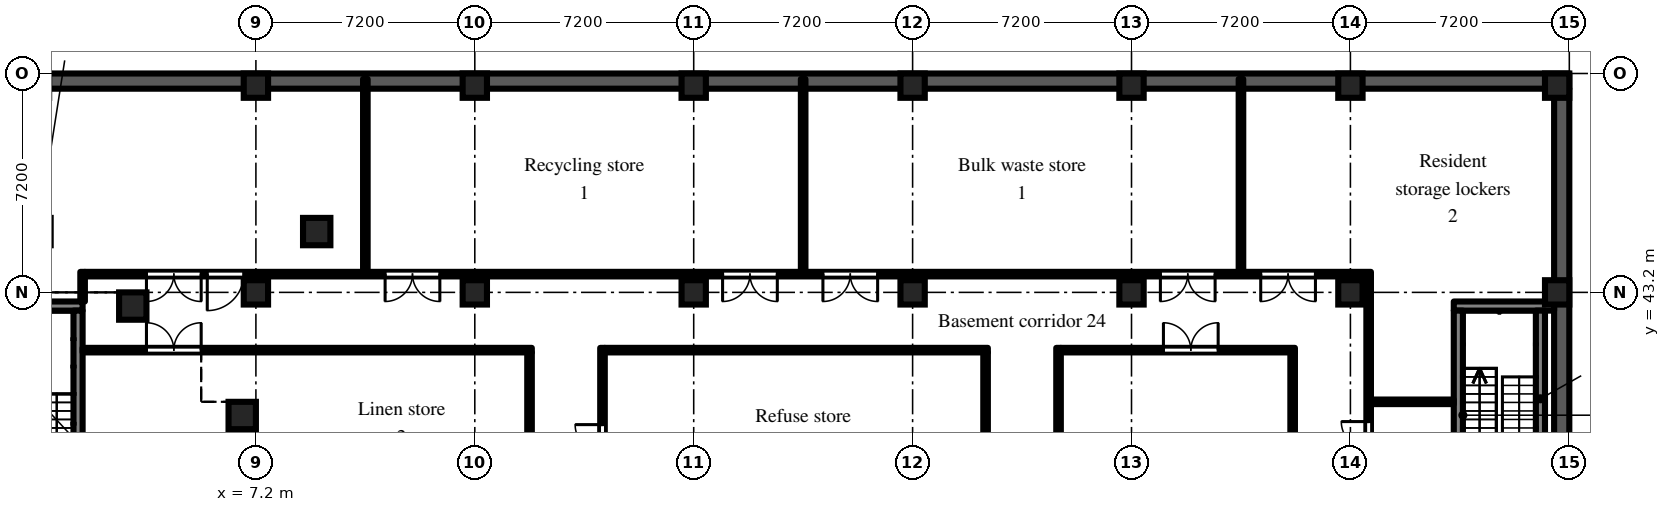
"""IFC4 building model, lengths in metres.
Left out: names, types, materials, properties, quantities, classifications, styles, units other than length and angle.
Written with IfcOpenShell. Run it as: python <this file> out.ifc"""

import sys

from ifc_helpers import new_model, si_unit, direction, frame, frame_2d, origin, origin_2d, place, context, subcontext, project, spatial, rectangle, extrude, element, fill, save


model = new_model("IFC4")
c1 = context("Model", 3, precision=1e-05, world=origin(), true_north=direction((0.0, 1.0)))
c2 = subcontext(c1, "Body", "Model", "MODEL_VIEW")
j1 = project(units=[si_unit("LENGTHUNIT", "METRE"), si_unit("PLANEANGLEUNIT", "RADIAN")], contexts=[c1])
p1 = place(None, origin())
s1 = spatial("IfcSite", under=j1, at=p1, CompositionType="ELEMENT")
p2 = place(p1, origin())
s2 = spatial("IfcBuilding", under=s1, at=p2, CompositionType="ELEMENT")
p3 = place(p2, frame((0.0, 0.0, -4.8)))
s3 = spatial("IfcBuildingStorey", under=s2, at=p3, CompositionType="ELEMENT", Elevation=-4.8)
p4 = place(p3, frame((-50.4, 50.15, -0.5), z_axis=(0.0, 0.0, 1.0), x_axis=(1.0, 0.0, 0.0)))
e1 = element("IfcWall", 1, at=p4, inside=s3, PredefinedType="SOLIDWALL", context=c2, shape_type="SweptSolid", body=[
    extrude(rectangle(XDim=100.8, YDim=0.5, at=frame_2d((50.4, 0.0))), origin(), (0.0, 0.0, 1.0), 5.3),
])
p5 = place(p3, frame((50.15, -49.9, -0.5), z_axis=(0.0, 0.0, 1.0), x_axis=(0.0, 1.0, 0.0)))
e2 = element("IfcWall", 2, at=p5, inside=s3, PredefinedType="SOLIDWALL", context=c2, shape_type="SweptSolid", body=[
    extrude(rectangle(XDim=99.8, YDim=0.5, at=frame_2d((49.9, 0.0))), origin(), (0.0, 0.0, 1.0), 5.3),
])
for number, where, z_axis, x_axis in (
    (3, (3.15, 42.75, -0.5), (0.0, 0.0, 1.0), (1.0, 0.0, 0.0)),
    (4, (6.75, 39.15, -0.5), (0.0, 0.0, 1.0), (1.0, 0.0, 0.0)),
):
    element("IfcColumn", number, at=place(p3, frame(where, z_axis=z_axis, x_axis=x_axis)), inside=s3, PredefinedType="COLUMN", context=c2, shape_type="SweptSolid", body=[
        extrude(rectangle(XDim=0.9, YDim=0.9, at=origin_2d()), origin(), (0.0, 0.0, 1.0), 5.3),
    ])
for number, where, z_axis, x_axis in (
    (5, (7.2, 43.2, -0.5), (0.0, 0.0, 1.0), (1.0, 0.0, 0.0)),
    (6, (7.2, 50.0, -0.5), (0.0, 0.0, 1.0), (1.0, 0.0, 0.0)),
    (7, (14.4, 43.2, -0.5), (0.0, 0.0, 1.0), (1.0, 0.0, 0.0)),
    (8, (14.4, 50.0, -0.5), (0.0, 0.0, 1.0), (1.0, 0.0, 0.0)),
    (9, (21.6, 43.2, -0.5), (0.0, 0.0, 1.0), (1.0, 0.0, 0.0)),
    (10, (21.6, 50.0, -0.5), (0.0, 0.0, 1.0), (1.0, 0.0, 0.0)),
    (11, (28.8, 43.2, -0.5), (0.0, 0.0, 1.0), (1.0, 0.0, 0.0)),
    (12, (28.8, 50.0, -0.5), (0.0, 0.0, 1.0), (1.0, 0.0, 0.0)),
    (13, (36.0, 43.2, -0.5), (0.0, 0.0, 1.0), (1.0, 0.0, 0.0)),
    (14, (36.0, 50.0, -0.5), (0.0, 0.0, 1.0), (1.0, 0.0, 0.0)),
    (15, (43.2, 43.2, -0.5), (0.0, 0.0, 1.0), (1.0, 0.0, 0.0)),
    (16, (43.2, 50.0, -0.5), (0.0, 0.0, 1.0), (1.0, 0.0, 0.0)),
    (17, (50.0, 43.2, -0.5), (0.0, 0.0, 1.0), (1.0, 0.0, 0.0)),
    (18, (50.0, 50.0, -0.5), (0.0, 0.0, 1.0), (1.0, 0.0, 0.0)),
):
    element("IfcColumn", number, at=place(p3, frame(where, z_axis=z_axis, x_axis=x_axis)), inside=s3, PredefinedType="COLUMN", context=c2, shape_type="SweptSolid", body=[
        extrude(rectangle(XDim=0.8, YDim=0.8, at=origin_2d()), origin(), (0.0, 0.0, 1.0), 5.3),
    ])
p6 = place(p3, frame((9.2, 45.2, -0.5), z_axis=(0.0, 0.0, 1.0), x_axis=(1.0, 0.0, 0.0)))
e19 = element("IfcColumn", 19, at=p6, inside=s3, PredefinedType="COLUMN", context=c2, shape_type="SweptSolid", body=[
    extrude(rectangle(XDim=0.9, YDim=0.9, at=origin_2d()), origin(), (0.0, 0.0, 1.0), 5.3),
])
p7 = place(p3, frame((-1.5, 42.75, 0.0), z_axis=(0.0, 0.0, 1.0), x_axis=(1.0, 0.0, 0.0)))
e20 = element("IfcWall", 20, at=p7, inside=s3, PredefinedType="SHEAR", context=c2, shape_type="SweptSolid", body=[
    extrude(rectangle(XDim=3.0, YDim=0.3, at=frame_2d((1.5, 0.0))), origin(), (0.0, 0.0, 1.0), 4.35),
])
p8 = place(p3, frame((1.35, 36.8, 0.0), z_axis=(0.0, 0.0, 1.0), x_axis=(0.0, 1.0, 0.0)))
e21 = element("IfcWall", 21, at=p8, inside=s3, PredefinedType="SHEAR", context=c2, shape_type="SweptSolid", body=[
    extrude(rectangle(XDim=5.8, YDim=0.3, at=frame_2d((2.9, 0.0))), origin(), (0.0, 0.0, 1.0), 4.35),
])
p9 = place(p3, frame((46.6, 42.75, 0.0), z_axis=(0.0, 0.0, 1.0), x_axis=(1.0, 0.0, 0.0)))
e22 = element("IfcWall", 22, at=p9, inside=s3, PredefinedType="SHEAR", context=c2, shape_type="SweptSolid", body=[
    extrude(rectangle(XDim=3.3, YDim=0.3, at=frame_2d((1.65, 0.0))), origin(), (0.0, 0.0, 1.0), 4.35),
])
for number, where, z_axis, x_axis in (
    (23, (46.75, 36.8, 0.0), (0.0, 0.0, 1.0), (0.0, 1.0, 0.0)),
    (24, (49.45, 36.8, 0.0), (0.0, 0.0, 1.0), (0.0, 1.0, 0.0)),
):
    element("IfcWall", number, at=place(p3, frame(where, z_axis=z_axis, x_axis=x_axis)), inside=s3, PredefinedType="SHEAR", context=c2, shape_type="SweptSolid", body=[
        extrude(rectangle(XDim=5.8, YDim=0.3, at=frame_2d((2.9, 0.0))), origin(), (0.0, 0.0, 1.0), 4.35),
    ])
p10 = place(p3, frame((1.5, 41.3, 0.0), z_axis=(0.0, 0.0, 1.0), x_axis=(1.0, 0.0, 0.0)))
e25 = element("IfcWall", 25, at=p10, inside=s3, PredefinedType="PARTITIONING", context=c2, shape_type="SweptSolid", body=[
    extrude(rectangle(XDim=14.775, YDim=0.15, at=frame_2d((7.387, 0.0))), origin(), (0.0, 0.0, 1.0), 4.35),
])
p11 = place(p10, frame((2.1, 0.0, 0.0)))
e26 = element("IfcOpeningElement", 26, at=p11, cuts=e25, PredefinedType="OPENING", context=c2, shape_type="SweptSolid", body=[
    extrude(rectangle(XDim=1.8, YDim=2.1, at=frame_2d((0.9, 1.05))), frame((0.0, 0.085, 0.0), z_axis=(0.0, -1.0, 0.0), x_axis=(1.0, 0.0, 0.0)), (0.0, 0.0, 1.0), 0.17),
])
p12 = place(p3, frame((1.5, 42.9, 0.0), z_axis=(0.0, 0.0, 1.0), x_axis=(0.0, 1.0, 0.0)))
e27 = element("IfcWall", 27, at=p12, inside=s3, PredefinedType="PARTITIONING", context=c2, shape_type="SweptSolid", body=[
    extrude(rectangle(XDim=0.975, YDim=0.15, at=frame_2d((0.488, 0.0))), origin(), (0.0, 0.0, 1.0), 4.35),
])
p13 = place(p3, frame((1.575, 43.8, 0.0), z_axis=(0.0, 0.0, 1.0), x_axis=(1.0, 0.0, 0.0)))
e28 = element("IfcWall", 28, at=p13, inside=s3, PredefinedType="PARTITIONING", context=c2, shape_type="SweptSolid", body=[
    extrude(rectangle(XDim=42.3, YDim=0.15, at=frame_2d((21.15, 0.0))), origin(), (0.0, 0.0, 1.0), 4.35),
])
p14 = place(p13, frame((2.025, 0.0, 0.0)))
e29 = element("IfcOpeningElement", 29, at=p14, cuts=e28, PredefinedType="OPENING", context=c2, shape_type="SweptSolid", body=[
    extrude(rectangle(XDim=1.8, YDim=2.1, at=frame_2d((0.9, 1.05))), frame((0.0, 0.085, 0.0), z_axis=(0.0, -1.0, 0.0), x_axis=(1.0, 0.0, 0.0)), (0.0, 0.0, 1.0), 0.17),
])
p15 = place(p13, frame((4.025, 0.0, 0.0)))
e30 = element("IfcOpeningElement", 30, at=p15, cuts=e28, PredefinedType="OPENING", context=c2, shape_type="SweptSolid", body=[
    extrude(rectangle(XDim=1.2, YDim=2.1, at=frame_2d((0.6, 1.05))), frame((0.0, 0.085, 0.0), z_axis=(0.0, -1.0, 0.0), x_axis=(1.0, 0.0, 0.0)), (0.0, 0.0, 1.0), 0.17),
])
p16 = place(p13, frame((9.875, 0.0, 0.0)))
e31 = element("IfcOpeningElement", 31, at=p16, cuts=e28, PredefinedType="OPENING", context=c2, shape_type="SweptSolid", body=[
    extrude(rectangle(XDim=1.8, YDim=2.1, at=frame_2d((0.9, 1.05))), frame((0.0, 0.085, 0.0), z_axis=(0.0, -1.0, 0.0), x_axis=(1.0, 0.0, 0.0)), (0.0, 0.0, 1.0), 0.17),
])
p17 = place(p13, frame((20.975, 0.0, 0.0)))
e32 = element("IfcOpeningElement", 32, at=p17, cuts=e28, PredefinedType="OPENING", context=c2, shape_type="SweptSolid", body=[
    extrude(rectangle(XDim=1.8, YDim=2.1, at=frame_2d((0.9, 1.05))), frame((0.0, 0.085, 0.0), z_axis=(0.0, -1.0, 0.0), x_axis=(1.0, 0.0, 0.0)), (0.0, 0.0, 1.0), 0.17),
])
p18 = place(p13, frame((24.275, 0.0, 0.0)))
e33 = element("IfcOpeningElement", 33, at=p18, cuts=e28, PredefinedType="OPENING", context=c2, shape_type="SweptSolid", body=[
    extrude(rectangle(XDim=1.8, YDim=2.1, at=frame_2d((0.9, 1.05))), frame((0.0, 0.085, 0.0), z_axis=(0.0, -1.0, 0.0), x_axis=(1.0, 0.0, 0.0)), (0.0, 0.0, 1.0), 0.17),
])
p19 = place(p13, frame((35.375, 0.0, 0.0)))
e34 = element("IfcOpeningElement", 34, at=p19, cuts=e28, PredefinedType="OPENING", context=c2, shape_type="SweptSolid", body=[
    extrude(rectangle(XDim=1.8, YDim=2.1, at=frame_2d((0.9, 1.05))), frame((0.0, 0.085, 0.0), z_axis=(0.0, -1.0, 0.0), x_axis=(1.0, 0.0, 0.0)), (0.0, 0.0, 1.0), 0.17),
])
p20 = place(p13, frame((38.675, 0.0, 0.0)))
e35 = element("IfcOpeningElement", 35, at=p20, cuts=e28, PredefinedType="OPENING", context=c2, shape_type="SweptSolid", body=[
    extrude(rectangle(XDim=1.8, YDim=2.1, at=frame_2d((0.9, 1.05))), frame((0.0, 0.085, 0.0), z_axis=(0.0, -1.0, 0.0), x_axis=(1.0, 0.0, 0.0)), (0.0, 0.0, 1.0), 0.17),
])
p21 = place(p3, frame((10.8, 43.875, 0.0), z_axis=(0.0, 0.0, 1.0), x_axis=(0.0, 1.0, 0.0)))
e36 = element("IfcWall", 36, at=p21, inside=s3, PredefinedType="PARTITIONING", context=c2, shape_type="SweptSolid", body=[
    extrude(rectangle(XDim=6.345, YDim=0.15, at=frame_2d((3.172, 0.0))), origin(), (0.0, 0.0, 1.0), 4.35),
])
p22 = place(p3, frame((16.2, 33.675, 0.0), z_axis=(0.0, 0.0, 1.0), x_axis=(0.0, 1.0, 0.0)))
e37 = element("IfcWall", 37, at=p22, inside=s3, PredefinedType="PARTITIONING", context=c2, shape_type="SweptSolid", body=[
    extrude(rectangle(XDim=7.55, YDim=0.15, at=frame_2d((3.775, 0.0))), origin(), (0.0, 0.0, 1.0), 4.35),
])
p23 = place(p22, frame((2.375, 0.0, 0.0)))
e38 = element("IfcOpeningElement", 38, at=p23, cuts=e37, PredefinedType="OPENING", context=c2, shape_type="SweptSolid", body=[
    extrude(rectangle(XDim=1.8, YDim=2.1, at=frame_2d((0.9, 1.05))), frame((0.0, 0.085, 0.0), z_axis=(0.0, -1.0, 0.0), x_axis=(1.0, 0.0, 0.0)), (0.0, 0.0, 1.0), 0.17),
])
p24 = place(p3, frame((18.6, 33.525, 0.0), z_axis=(0.0, 0.0, 1.0), x_axis=(0.0, 1.0, 0.0)))
e39 = element("IfcWall", 39, at=p24, inside=s3, PredefinedType="PARTITIONING", context=c2, shape_type="SweptSolid", body=[
    extrude(rectangle(XDim=7.85, YDim=0.15, at=frame_2d((3.925, 0.0))), origin(), (0.0, 0.0, 1.0), 4.35),
])
p25 = place(p24, frame((3.525, 0.0, 0.0)))
e40 = element("IfcOpeningElement", 40, at=p25, cuts=e39, PredefinedType="OPENING", context=c2, shape_type="SweptSolid", body=[
    extrude(rectangle(XDim=1.8, YDim=2.1, at=frame_2d((0.9, 1.05))), frame((0.0, 0.085, 0.0), z_axis=(0.0, -1.0, 0.0), x_axis=(1.0, 0.0, 0.0)), (0.0, 0.0, 1.0), 0.17),
])
p26 = place(p3, frame((18.675, 41.3, 0.0), z_axis=(0.0, 0.0, 1.0), x_axis=(1.0, 0.0, 0.0)))
e41 = element("IfcWall", 41, at=p26, inside=s3, PredefinedType="PARTITIONING", context=c2, shape_type="SweptSolid", body=[
    extrude(rectangle(XDim=12.6, YDim=0.15, at=frame_2d((6.3, 0.0))), origin(), (0.0, 0.0, 1.0), 4.35),
])
p27 = place(p3, frame((25.2, 43.875, 0.0), z_axis=(0.0, 0.0, 1.0), x_axis=(0.0, 1.0, 0.0)))
e42 = element("IfcWall", 42, at=p27, inside=s3, PredefinedType="PARTITIONING", context=c2, shape_type="SweptSolid", body=[
    extrude(rectangle(XDim=6.345, YDim=0.15, at=frame_2d((3.172, 0.0))), origin(), (0.0, 0.0, 1.0), 4.35),
])
p28 = place(p3, frame((31.2, 33.675, 0.0), z_axis=(0.0, 0.0, 1.0), x_axis=(0.0, 1.0, 0.0)))
e43 = element("IfcWall", 43, at=p28, inside=s3, PredefinedType="PARTITIONING", context=c2, shape_type="SweptSolid", body=[
    extrude(rectangle(XDim=7.55, YDim=0.15, at=frame_2d((3.775, 0.0))), origin(), (0.0, 0.0, 1.0), 4.35),
])
p29 = place(p28, frame((2.375, 0.0, 0.0)))
e44 = element("IfcOpeningElement", 44, at=p29, cuts=e43, PredefinedType="OPENING", context=c2, shape_type="SweptSolid", body=[
    extrude(rectangle(XDim=1.8, YDim=2.1, at=frame_2d((0.9, 1.05))), frame((0.0, 0.085, 0.0), z_axis=(0.0, -1.0, 0.0), x_axis=(1.0, 0.0, 0.0)), (0.0, 0.0, 1.0), 0.17),
])
p30 = place(p3, frame((33.6, 33.525, 0.0), z_axis=(0.0, 0.0, 1.0), x_axis=(0.0, 1.0, 0.0)))
e45 = element("IfcWall", 45, at=p30, inside=s3, PredefinedType="PARTITIONING", context=c2, shape_type="SweptSolid", body=[
    extrude(rectangle(XDim=7.85, YDim=0.15, at=frame_2d((3.925, 0.0))), origin(), (0.0, 0.0, 1.0), 4.35),
])
p31 = place(p3, frame((33.675, 41.3, 0.0), z_axis=(0.0, 0.0, 1.0), x_axis=(1.0, 0.0, 0.0)))
e46 = element("IfcWall", 46, at=p31, inside=s3, PredefinedType="PARTITIONING", context=c2, shape_type="SweptSolid", body=[
    extrude(rectangle(XDim=7.7, YDim=0.15, at=frame_2d((3.85, 0.0))), origin(), (0.0, 0.0, 1.0), 4.35),
])
p32 = place(p31, frame((3.375, 0.0, 0.0)))
e47 = element("IfcOpeningElement", 47, at=p32, cuts=e46, PredefinedType="OPENING", context=c2, shape_type="SweptSolid", body=[
    extrude(rectangle(XDim=1.8, YDim=2.1, at=frame_2d((0.9, 1.05))), frame((0.0, 0.085, 0.0), z_axis=(0.0, -1.0, 0.0), x_axis=(1.0, 0.0, 0.0)), (0.0, 0.0, 1.0), 0.17),
])
p33 = place(p3, frame((39.6, 43.875, 0.0), z_axis=(0.0, 0.0, 1.0), x_axis=(0.0, 1.0, 0.0)))
e48 = element("IfcWall", 48, at=p33, inside=s3, PredefinedType="PARTITIONING", context=c2, shape_type="SweptSolid", body=[
    extrude(rectangle(XDim=6.345, YDim=0.15, at=frame_2d((3.172, 0.0))), origin(), (0.0, 0.0, 1.0), 4.35),
])
p34 = place(p3, frame((41.3, 33.675, 0.0), z_axis=(0.0, 0.0, 1.0), x_axis=(0.0, 1.0, 0.0)))
e49 = element("IfcWall", 49, at=p34, inside=s3, PredefinedType="PARTITIONING", context=c2, shape_type="SweptSolid", body=[
    extrude(rectangle(XDim=7.55, YDim=0.15, at=frame_2d((3.775, 0.0))), origin(), (0.0, 0.0, 1.0), 4.35),
])
p35 = place(p3, frame((43.8, 33.525, 0.0), z_axis=(0.0, 0.0, 1.0), x_axis=(0.0, 1.0, 0.0)))
e50 = element("IfcWall", 50, at=p35, inside=s3, PredefinedType="PARTITIONING", context=c2, shape_type="SweptSolid", body=[
    extrude(rectangle(XDim=10.2, YDim=0.15, at=frame_2d((5.1, 0.0))), origin(), (0.0, 0.0, 1.0), 4.35),
])
p36 = place(p35, frame((3.625, 0.0, 0.0)))
e51 = element("IfcOpeningElement", 51, at=p36, cuts=e50, PredefinedType="OPENING", context=c2, shape_type="SweptSolid", body=[
    extrude(rectangle(XDim=1.8, YDim=2.1, at=frame_2d((0.9, 1.05))), frame((0.0, 0.085, 0.0), z_axis=(0.0, -1.0, 0.0), x_axis=(1.0, 0.0, 0.0)), (0.0, 0.0, 1.0), 0.17),
])
p37 = place(p3, frame((43.875, 39.6, 0.0), z_axis=(0.0, 0.0, 1.0), x_axis=(1.0, 0.0, 0.0)))
e52 = element("IfcWall", 52, at=p37, inside=s3, PredefinedType="PARTITIONING", context=c2, shape_type="SweptSolid", body=[
    extrude(rectangle(XDim=2.725, YDim=0.15, at=frame_2d((1.363, 0.0))), origin(), (0.0, 0.0, 1.0), 4.35),
])
p38 = place(p14, frame((1.8, 0.0, 0.0), z_axis=(0.0, 0.0, 1.0), x_axis=(-1.0, 0.0, 0.0)))
e53 = element("IfcDoor", 53, at=p38, inside=s3, OperationType="DOUBLE_DOOR_DOUBLE_SWING", PredefinedType="DOOR", context=c2, shape_type="SweptSolid", body=[
    extrude(rectangle(XDim=1.8, YDim=2.1, at=frame_2d((0.9, 1.05))), frame((0.0, 0.025, 0.0), z_axis=(0.0, -1.0, 0.0), x_axis=(1.0, 0.0, 0.0)), (0.0, 0.0, 1.0), 0.05),
])
fill(e29, e53)
p39 = place(p15, frame((1.2, 0.0, 0.0), z_axis=(0.0, 0.0, 1.0), x_axis=(-1.0, 0.0, 0.0)))
e54 = element("IfcDoor", 54, at=p39, inside=s3, OperationType="SINGLE_SWING_RIGHT", PredefinedType="DOOR", context=c2, shape_type="SweptSolid", body=[
    extrude(rectangle(XDim=1.2, YDim=2.1, at=frame_2d((0.6, 1.05))), frame((0.0, 0.025, 0.0), z_axis=(0.0, -1.0, 0.0), x_axis=(1.0, 0.0, 0.0)), (0.0, 0.0, 1.0), 0.05),
])
fill(e30, e54)
p40 = place(p16, frame((1.8, 0.0, 0.0), z_axis=(0.0, 0.0, 1.0), x_axis=(-1.0, 0.0, 0.0)))
e55 = element("IfcDoor", 55, at=p40, inside=s3, OperationType="DOUBLE_DOOR_DOUBLE_SWING", PredefinedType="DOOR", context=c2, shape_type="SweptSolid", body=[
    extrude(rectangle(XDim=1.8, YDim=2.1, at=frame_2d((0.9, 1.05))), frame((0.0, 0.025, 0.0), z_axis=(0.0, -1.0, 0.0), x_axis=(1.0, 0.0, 0.0)), (0.0, 0.0, 1.0), 0.05),
])
fill(e31, e55)
p41 = place(p17, frame((1.8, 0.0, 0.0), z_axis=(0.0, 0.0, 1.0), x_axis=(-1.0, 0.0, 0.0)))
e56 = element("IfcDoor", 56, at=p41, inside=s3, OperationType="DOUBLE_DOOR_DOUBLE_SWING", PredefinedType="DOOR", context=c2, shape_type="SweptSolid", body=[
    extrude(rectangle(XDim=1.8, YDim=2.1, at=frame_2d((0.9, 1.05))), frame((0.0, 0.025, 0.0), z_axis=(0.0, -1.0, 0.0), x_axis=(1.0, 0.0, 0.0)), (0.0, 0.0, 1.0), 0.05),
])
fill(e32, e56)
p42 = place(p18, frame((1.8, 0.0, 0.0), z_axis=(0.0, 0.0, 1.0), x_axis=(-1.0, 0.0, 0.0)))
e57 = element("IfcDoor", 57, at=p42, inside=s3, OperationType="DOUBLE_DOOR_DOUBLE_SWING", PredefinedType="DOOR", context=c2, shape_type="SweptSolid", body=[
    extrude(rectangle(XDim=1.8, YDim=2.1, at=frame_2d((0.9, 1.05))), frame((0.0, 0.025, 0.0), z_axis=(0.0, -1.0, 0.0), x_axis=(1.0, 0.0, 0.0)), (0.0, 0.0, 1.0), 0.05),
])
fill(e33, e57)
p43 = place(p19, frame((1.8, 0.0, 0.0), z_axis=(0.0, 0.0, 1.0), x_axis=(-1.0, 0.0, 0.0)))
e58 = element("IfcDoor", 58, at=p43, inside=s3, OperationType="DOUBLE_DOOR_DOUBLE_SWING", PredefinedType="DOOR", context=c2, shape_type="SweptSolid", body=[
    extrude(rectangle(XDim=1.8, YDim=2.1, at=frame_2d((0.9, 1.05))), frame((0.0, 0.025, 0.0), z_axis=(0.0, -1.0, 0.0), x_axis=(1.0, 0.0, 0.0)), (0.0, 0.0, 1.0), 0.05),
])
fill(e34, e58)
p44 = place(p20, frame((1.8, 0.0, 0.0), z_axis=(0.0, 0.0, 1.0), x_axis=(-1.0, 0.0, 0.0)))
e59 = element("IfcDoor", 59, at=p44, inside=s3, OperationType="DOUBLE_DOOR_DOUBLE_SWING", PredefinedType="DOOR", context=c2, shape_type="SweptSolid", body=[
    extrude(rectangle(XDim=1.8, YDim=2.1, at=frame_2d((0.9, 1.05))), frame((0.0, 0.025, 0.0), z_axis=(0.0, -1.0, 0.0), x_axis=(1.0, 0.0, 0.0)), (0.0, 0.0, 1.0), 0.05),
])
fill(e35, e59)
p45 = place(p11, origin())
e60 = element("IfcDoor", 60, at=p45, inside=s3, OperationType="DOUBLE_DOOR_DOUBLE_SWING", PredefinedType="DOOR", context=c2, shape_type="SweptSolid", body=[
    extrude(rectangle(XDim=1.8, YDim=2.1, at=frame_2d((0.9, 1.05))), frame((0.0, 0.025, 0.0), z_axis=(0.0, -1.0, 0.0), x_axis=(1.0, 0.0, 0.0)), (0.0, 0.0, 1.0), 0.05),
])
fill(e26, e60)
p46 = place(p25, origin())
e61 = element("IfcDoor", 61, at=p46, inside=s3, OperationType="DOUBLE_DOOR_DOUBLE_SWING", PredefinedType="DOOR", context=c2, shape_type="SweptSolid", body=[
    extrude(rectangle(XDim=1.8, YDim=2.1, at=frame_2d((0.9, 1.05))), frame((0.0, 0.025, 0.0), z_axis=(0.0, -1.0, 0.0), x_axis=(1.0, 0.0, 0.0)), (0.0, 0.0, 1.0), 0.05),
])
fill(e40, e61)
p47 = place(p32, origin())
e62 = element("IfcDoor", 62, at=p47, inside=s3, OperationType="DOUBLE_DOOR_DOUBLE_SWING", PredefinedType="DOOR", context=c2, shape_type="SweptSolid", body=[
    extrude(rectangle(XDim=1.8, YDim=2.1, at=frame_2d((0.9, 1.05))), frame((0.0, 0.025, 0.0), z_axis=(0.0, -1.0, 0.0), x_axis=(1.0, 0.0, 0.0)), (0.0, 0.0, 1.0), 0.05),
])
fill(e47, e62)
p48 = place(p36, origin())
e63 = element("IfcDoor", 63, at=p48, inside=s3, OperationType="DOUBLE_DOOR_DOUBLE_SWING", PredefinedType="DOOR", context=c2, shape_type="SweptSolid", body=[
    extrude(rectangle(XDim=1.8, YDim=2.1, at=frame_2d((0.9, 1.05))), frame((0.0, 0.025, 0.0), z_axis=(0.0, -1.0, 0.0), x_axis=(1.0, 0.0, 0.0)), (0.0, 0.0, 1.0), 0.05),
])
fill(e51, e63)
save(model, sys.argv[1])
